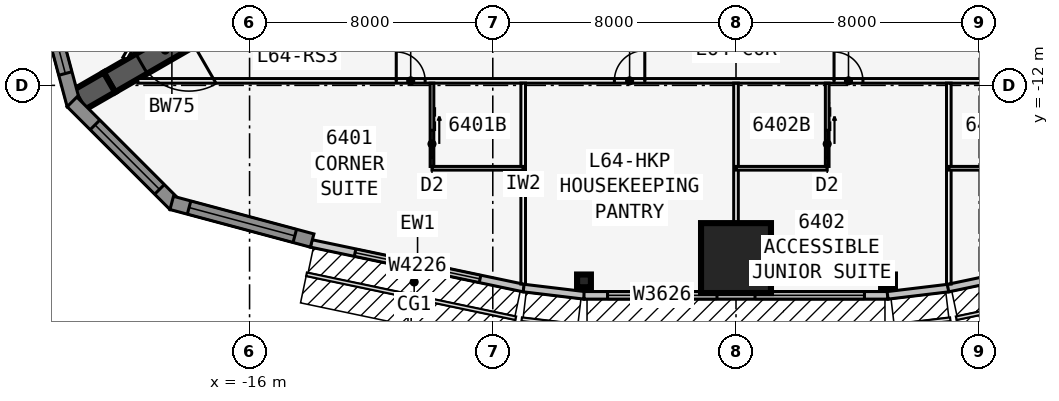
"""IFC4 building model, lengths in metres.
Left out: names, types, materials, properties, quantities, classifications, styles, units other than length and angle.
Written with IfcOpenShell. Run it as: python <this file> out.ifc"""

import sys

from ifc_helpers import new_model, si_unit, direction, frame, frame_2d, origin, origin_2d, place, context, subcontext, project, spatial, polyline, rectangle, i_section, outline, extrude, element, fill, save


model = new_model("IFC4")
c1 = context("Model", 3, precision=1e-05, world=origin(), true_north=direction((0.0, 1.0)))
c2 = subcontext(c1, "Body", "Model", "MODEL_VIEW")
j1 = project(units=[si_unit("LENGTHUNIT", "METRE"), si_unit("PLANEANGLEUNIT", "RADIAN")], contexts=[c1])
p1 = place(None, origin())
s1 = spatial("IfcSite", under=j1, at=p1, CompositionType="ELEMENT")
p2 = place(p1, origin())
s2 = spatial("IfcBuilding", under=s1, at=p2, CompositionType="ELEMENT")
p3 = place(p2, frame((0.0, 0.0, 242.9)))
s3 = spatial("IfcBuildingStorey", under=s2, at=p3, CompositionType="ELEMENT", Elevation=242.9)
p4 = place(p3, frame((-16.5, -9.526, 0.0), z_axis=(0.0, 0.0, 1.0), x_axis=(-0.866031398331, -0.499989616998, 0.0)))
e1 = element("IfcWall", 1, at=p4, inside=s3, PredefinedType="SHEAR", context=c2, shape_type="SweptSolid", body=[
    extrude(rectangle(XDim=4.746, YDim=0.75, at=frame_2d((2.373, 0.0))), origin(), (0.0, 0.0, 1.0), 3.6),
])
p5 = place(p4, frame((1.725, 0.0, 0.0)))
e2 = element("IfcOpeningElement", 2, at=p5, cuts=e1, PredefinedType="OPENING", context=c2, shape_type="SweptSolid", body=[
    extrude(rectangle(XDim=1.8, YDim=2.13, at=frame_2d((0.9, 1.065))), frame((0.0, 0.385, 0.0), z_axis=(0.0, -1.0, 0.0), x_axis=(1.0, 0.0, 0.0)), (0.0, 0.0, 1.0), 0.77),
])
p6 = place(p3, frame((-20.61, -11.899, 0.0), z_axis=(0.0, 0.0, 1.0), x_axis=(-0.866009537788, -0.500027479704, 0.0)))
e3 = element("IfcWall", 3, at=p6, inside=s3, PredefinedType="SHEAR", context=c2, shape_type="SweptSolid", body=[
    extrude(rectangle(XDim=1.155, YDim=0.75, at=frame_2d((0.577, 0.0))), origin(), (0.0, 0.0, 1.0), 3.6),
])
for number, where, z_axis, x_axis in (
    (4, (-5.0, -18.43, 0.0), (0.0, 0.0, 1.0), (0.0, -1.0, 0.0)),
    (5, (5.0, -18.43, 0.0), (0.0, 0.0, 1.0), (0.0, -1.0, 0.0)),
):
    element("IfcColumn", number, at=place(p3, frame(where, z_axis=z_axis, x_axis=x_axis)), inside=s3, PredefinedType="COLUMN", context=c2, shape_type="SweptSolid", body=[
        extrude(i_section(OverallWidth=0.419, OverallDepth=0.455, WebThickness=0.042, FlangeThickness=0.068, at=origin_2d()), origin(), (0.0, 0.0, 1.0), 3.6),
    ])
p7 = place(p3, frame((0.0, -17.68, 0.0), z_axis=(0.0, 0.0, 1.0), x_axis=(0.0, -1.0, 0.0)))
e6 = element("IfcColumn", 6, at=p7, inside=s3, PredefinedType="COLUMN", context=c2, shape_type="SweptSolid", body=[
    extrude(rectangle(XDim=2.3, YDim=2.3, at=origin_2d()), origin(), (0.0, 0.0, 1.0), 3.6),
])
p8 = place(p3, frame((-13.974, -17.198, 0.0), z_axis=(0.0, 0.0, 1.0), x_axis=(0.978654320409, -0.205513311355, 0.0)))
e7 = element("IfcWall", 7, at=p8, inside=s3, PredefinedType="STANDARD", context=c2, shape_type="SweptSolid", body=[
    extrude(rectangle(XDim=7.153, YDim=0.25, at=frame_2d((3.576, 0.0))), origin(), (0.0, 0.0, 1.0), 3.435),
])
p9 = place(p8, frame((1.476, 0.0, 0.45)))
e8 = element("IfcOpeningElement", 8, at=p9, cuts=e7, PredefinedType="OPENING", context=c2, shape_type="SweptSolid", body=[
    extrude(rectangle(XDim=4.2, YDim=2.6, at=frame_2d((2.1, 1.3))), frame((0.0, 0.135, 0.0), z_axis=(0.0, -1.0, 0.0), x_axis=(1.0, 0.0, 0.0)), (0.0, 0.0, 1.0), 0.27),
])
p10 = place(p3, frame((-6.985, -18.667, 0.0), z_axis=(0.0, 0.0, 1.0), x_axis=(0.992877411981, -0.119140441403, 0.0)))
e9 = element("IfcWall", 9, at=p10, inside=s3, PredefinedType="STANDARD", context=c2, shape_type="SweptSolid", body=[
    extrude(rectangle(XDim=2.014, YDim=0.25, at=frame_2d((1.007, 0.0))), origin(), (0.0, 0.0, 1.0), 3.435),
])
p11 = place(p3, frame((-5.0, -18.906, 0.0), z_axis=(0.0, 0.0, 1.0), x_axis=(1.0, 0.0, 0.0)))
e10 = element("IfcWall", 10, at=p11, inside=s3, PredefinedType="STANDARD", context=c2, shape_type="SweptSolid", body=[
    extrude(rectangle(XDim=10.0, YDim=0.25, at=frame_2d((5.0, 0.0))), origin(), (0.0, 0.0, 1.0), 3.435),
])
p12 = place(p11, frame((0.775, 0.0, 0.45)))
e11 = element("IfcOpeningElement", 11, at=p12, cuts=e10, PredefinedType="OPENING", context=c2, shape_type="SweptSolid", body=[
    extrude(rectangle(XDim=3.6, YDim=2.6, at=frame_2d((1.8, 1.3))), frame((0.0, 0.135, 0.0), z_axis=(0.0, -1.0, 0.0), x_axis=(1.0, 0.0, 0.0)), (0.0, 0.0, 1.0), 0.27),
])
p13 = place(p11, frame((5.625, 0.0, 0.45)))
e12 = element("IfcOpeningElement", 12, at=p13, cuts=e10, PredefinedType="OPENING", context=c2, shape_type="SweptSolid", body=[
    extrude(rectangle(XDim=3.6, YDim=2.6, at=frame_2d((1.8, 1.3))), frame((0.0, 0.135, 0.0), z_axis=(0.0, -1.0, 0.0), x_axis=(1.0, 0.0, 0.0)), (0.0, 0.0, 1.0), 0.27),
])
p14 = place(p3, frame((4.985, -18.906, 0.0), z_axis=(0.0, 0.0, 1.0), x_axis=(0.992877411981, 0.119140441403, 0.0)))
e13 = element("IfcWall", 13, at=p14, inside=s3, PredefinedType="STANDARD", context=c2, shape_type="SweptSolid", body=[
    extrude(rectangle(XDim=2.014, YDim=0.25, at=frame_2d((1.007, 0.0))), origin(), (0.0, 0.0, 1.0), 3.435),
])
p15 = place(p3, frame((6.974, -18.668, 0.0), z_axis=(0.0, 0.0, 1.0), x_axis=(0.978654320409, 0.205513311355, 0.0)))
e14 = element("IfcWall", 14, at=p15, inside=s3, PredefinedType="STANDARD", context=c2, shape_type="SweptSolid", body=[
    extrude(rectangle(XDim=7.153, YDim=0.25, at=frame_2d((3.576, 0.0))), origin(), (0.0, 0.0, 1.0), 3.435),
])
p16 = place(p15, frame((1.476, 0.0, 0.45)))
e15 = element("IfcOpeningElement", 15, at=p16, cuts=e14, PredefinedType="OPENING", context=c2, shape_type="SweptSolid", body=[
    extrude(rectangle(XDim=4.2, YDim=2.6, at=frame_2d((2.1, 1.3))), frame((0.0, 0.135, 0.0), z_axis=(0.0, -1.0, 0.0), x_axis=(1.0, 0.0, 0.0)), (0.0, 0.0, 1.0), 0.27),
])
p17 = place(p3, frame((-23.02, -8.025, 0.0), z_axis=(0.0, 0.0, 1.0), x_axis=(0.25880328844, -0.965930048136, 0.0)))
e16 = element("IfcWall", 16, at=p17, inside=s3, PredefinedType="SOLIDWALL", context=c2, shape_type="SweptSolid", body=[
    extrude(outline(polyline([(4.782, 0.225), (4.722, 0.225), (4.303, 0.113), (4.273, 0.225), (0.0, 0.225), (0.0, -0.225), (4.782, -0.225), (4.782, 0.225)])), origin(), (0.0, 0.0, 1.0), 3.435),
])
p18 = place(p17, frame((0.711, 0.0, 0.45)))
e17 = element("IfcOpeningElement", 17, at=p18, cuts=e16, PredefinedType="OPENING", context=c2, shape_type="SweptSolid", body=[
    extrude(rectangle(XDim=3.0, YDim=2.6, at=frame_2d((1.5, 1.3))), frame((0.0, 0.235, 0.0), z_axis=(0.0, -1.0, 0.0), x_axis=(1.0, 0.0, 0.0)), (0.0, 0.0, 1.0), 0.47),
])
p19 = place(p3, frame((-21.841, -12.542, 0.0), z_axis=(0.0, 0.0, 1.0), x_axis=(0.707081252484, -0.707132308968, 0.0)))
e18 = element("IfcWall", 18, at=p19, inside=s3, PredefinedType="SOLIDWALL", context=c2, shape_type="SweptSolid", body=[
    extrude(outline(polyline([(4.782, 0.225), (0.509, 0.225), (0.479, 0.113), (0.059, 0.225), (0.0, 0.225), (0.0, -0.225), (4.782, -0.225), (4.782, 0.225)])), origin(), (0.0, 0.0, 1.0), 3.435),
])
p20 = place(p19, frame((1.07, 0.0, 0.45)))
e19 = element("IfcOpeningElement", 19, at=p20, cuts=e18, PredefinedType="OPENING", context=c2, shape_type="SweptSolid", body=[
    extrude(rectangle(XDim=3.0, YDim=2.6, at=frame_2d((1.5, 1.3))), frame((0.0, 0.235, 0.0), z_axis=(0.0, -1.0, 0.0), x_axis=(1.0, 0.0, 0.0)), (0.0, 0.0, 1.0), 0.47),
])
p21 = place(p3, frame((-18.561, -15.865, 0.0), z_axis=(0.0, 0.0, 1.0), x_axis=(0.965913862671, -0.258863689806, 0.0)))
e20 = element("IfcWall", 20, at=p21, inside=s3, PredefinedType="SOLIDWALL", context=c2, shape_type="SweptSolid", body=[
    extrude(rectangle(XDim=4.782, YDim=0.45, at=frame_2d((2.391, 0.0))), origin(), (0.0, 0.0, 1.0), 3.435),
])
p22 = place(p21, frame((0.591, 0.0, 0.45)))
e21 = element("IfcOpeningElement", 21, at=p22, cuts=e20, PredefinedType="OPENING", context=c2, shape_type="SweptSolid", body=[
    extrude(rectangle(XDim=3.6, YDim=2.6, at=frame_2d((1.8, 1.3))), frame((0.0, 0.235, 0.0), z_axis=(0.0, -1.0, 0.0), x_axis=(1.0, 0.0, 0.0)), (0.0, 0.0, 1.0), 0.47),
])
p23 = place(p3, frame((-19.677, -11.851, 0.0), z_axis=(0.0, 0.0, 1.0), x_axis=(1.0, 0.0, 0.0)))
e22 = element("IfcWall", 22, at=p23, inside=s3, PredefinedType="PARTITIONING", context=c2, shape_type="SweptSolid", body=[
    extrude(rectangle(XDim=39.354, YDim=0.15, at=frame_2d((19.677, 0.0))), origin(), (0.0, 0.0, 1.0), 3.435),
])
p24 = place(p23, frame((8.502, 0.0, 0.0)))
e23 = element("IfcOpeningElement", 23, at=p24, cuts=e22, PredefinedType="OPENING", context=c2, shape_type="SweptSolid", body=[
    extrude(rectangle(XDim=0.95, YDim=2.13, at=frame_2d((0.475, 1.065))), frame((0.0, 0.085, 0.0), z_axis=(0.0, -1.0, 0.0), x_axis=(1.0, 0.0, 0.0)), (0.0, 0.0, 1.0), 0.17),
])
p25 = place(p23, frame((15.677, 0.0, 0.0)))
e24 = element("IfcOpeningElement", 24, at=p25, cuts=e22, PredefinedType="OPENING", context=c2, shape_type="SweptSolid", body=[
    extrude(rectangle(XDim=1.0, YDim=2.13, at=frame_2d((0.5, 1.065))), frame((0.0, 0.085, 0.0), z_axis=(0.0, -1.0, 0.0), x_axis=(1.0, 0.0, 0.0)), (0.0, 0.0, 1.0), 0.17),
])
p26 = place(p23, frame((22.902, 0.0, 0.0)))
e25 = element("IfcOpeningElement", 25, at=p26, cuts=e22, PredefinedType="OPENING", context=c2, shape_type="SweptSolid", body=[
    extrude(rectangle(XDim=0.95, YDim=2.13, at=frame_2d((0.475, 1.065))), frame((0.0, 0.085, 0.0), z_axis=(0.0, -1.0, 0.0), x_axis=(1.0, 0.0, 0.0)), (0.0, 0.0, 1.0), 0.17),
])
p27 = place(p23, frame((29.902, 0.0, 0.0)))
e26 = element("IfcOpeningElement", 26, at=p27, cuts=e22, PredefinedType="OPENING", context=c2, shape_type="SweptSolid", body=[
    extrude(rectangle(XDim=0.95, YDim=2.13, at=frame_2d((0.475, 1.065))), frame((0.0, 0.085, 0.0), z_axis=(0.0, -1.0, 0.0), x_axis=(1.0, 0.0, 0.0)), (0.0, 0.0, 1.0), 0.17),
])
p28 = place(p3, frame((-7.0, -11.926, 0.0), z_axis=(0.0, 0.0, 1.0), x_axis=(0.0, -1.0, 0.0)))
e27 = element("IfcWall", 27, at=p28, inside=s3, PredefinedType="PARTITIONING", context=c2, shape_type="SweptSolid", body=[
    extrude(rectangle(XDim=6.609, YDim=0.15, at=frame_2d((3.304, 0.0))), origin(), (0.0, 0.0, 1.0), 2.678),
])
p29 = place(p3, frame((0.0, -11.926, 0.0), z_axis=(0.0, 0.0, 1.0), x_axis=(0.0, -1.0, 0.0)))
e28 = element("IfcWall", 28, at=p29, inside=s3, PredefinedType="PARTITIONING", context=c2, shape_type="SweptSolid", body=[
    extrude(rectangle(XDim=6.854, YDim=0.15, at=frame_2d((3.427, 0.0))), origin(), (0.0, 0.0, 1.0), 2.678),
])
p30 = place(p3, frame((7.0, -11.926, 0.0), z_axis=(0.0, 0.0, 1.0), x_axis=(0.0, -1.0, 0.0)))
e29 = element("IfcWall", 29, at=p30, inside=s3, PredefinedType="PARTITIONING", context=c2, shape_type="SweptSolid", body=[
    extrude(rectangle(XDim=6.609, YDim=0.15, at=frame_2d((3.304, 0.0))), origin(), (0.0, 0.0, 1.0), 2.678),
])
p31 = place(p3, frame((-10.0, -14.726, 0.0), z_axis=(0.0, 0.0, 1.0), x_axis=(1.0, 0.0, 0.0)))
e30 = element("IfcWall", 30, at=p31, inside=s3, PredefinedType="PLUMBINGWALL", context=c2, shape_type="SweptSolid", body=[
    extrude(rectangle(XDim=3.0, YDim=0.12, at=frame_2d((1.5, 0.0))), origin(), (0.0, 0.0, 1.0), 3.435),
])
p32 = place(p3, frame((-10.0, -11.926, 0.0), z_axis=(0.0, 0.0, 1.0), x_axis=(0.0, -1.0, 0.0)))
e31 = element("IfcWall", 31, at=p32, inside=s3, PredefinedType="PLUMBINGWALL", context=c2, shape_type="SweptSolid", body=[
    extrude(rectangle(XDim=2.74, YDim=0.12, at=frame_2d((1.37, 0.0))), origin(), (0.0, 0.0, 1.0), 3.435),
])
p33 = place(p32, frame((1.55, 0.0, 0.0)))
e32 = element("IfcOpeningElement", 32, at=p33, cuts=e31, PredefinedType="OPENING", context=c2, shape_type="SweptSolid", body=[
    extrude(rectangle(XDim=0.9, YDim=2.13, at=frame_2d((0.45, 1.065))), frame((0.0, 0.07, 0.0), z_axis=(0.0, -1.0, 0.0), x_axis=(1.0, 0.0, 0.0)), (0.0, 0.0, 1.0), 0.14),
])
p34 = place(p3, frame((0.0, -14.726, 0.0), z_axis=(0.0, 0.0, 1.0), x_axis=(1.0, 0.0, 0.0)))
e33 = element("IfcWall", 33, at=p34, inside=s3, PredefinedType="PLUMBINGWALL", context=c2, shape_type="SweptSolid", body=[
    extrude(rectangle(XDim=3.0, YDim=0.12, at=frame_2d((1.5, 0.0))), origin(), (0.0, 0.0, 1.0), 3.435),
])
p35 = place(p3, frame((3.0, -11.926, 0.0), z_axis=(0.0, 0.0, 1.0), x_axis=(0.0, -1.0, 0.0)))
e34 = element("IfcWall", 34, at=p35, inside=s3, PredefinedType="PLUMBINGWALL", context=c2, shape_type="SweptSolid", body=[
    extrude(rectangle(XDim=2.74, YDim=0.12, at=frame_2d((1.37, 0.0))), origin(), (0.0, 0.0, 1.0), 3.435),
])
p36 = place(p35, frame((1.55, 0.0, 0.0)))
e35 = element("IfcOpeningElement", 35, at=p36, cuts=e34, PredefinedType="OPENING", context=c2, shape_type="SweptSolid", body=[
    extrude(rectangle(XDim=0.9, YDim=2.13, at=frame_2d((0.45, 1.065))), frame((0.0, 0.07, 0.0), z_axis=(0.0, -1.0, 0.0), x_axis=(1.0, 0.0, 0.0)), (0.0, 0.0, 1.0), 0.14),
])
p37 = place(p3, frame((7.0, -14.726, 0.0), z_axis=(0.0, 0.0, 1.0), x_axis=(1.0, 0.0, 0.0)))
e36 = element("IfcWall", 36, at=p37, inside=s3, PredefinedType="PLUMBINGWALL", context=c2, shape_type="SweptSolid", body=[
    extrude(rectangle(XDim=3.0, YDim=0.12, at=frame_2d((1.5, 0.0))), origin(), (0.0, 0.0, 1.0), 3.435),
])
p38 = place(p3, frame((-0.425, 22.966, 0.0), z_axis=(0.0, 0.0, 1.0), x_axis=(-0.500000265775, -0.866025250339, 0.0)))
e37 = element("IfcWall", 37, at=p38, inside=s3, PredefinedType="PARTITIONING", context=c2, shape_type="SweptSolid", body=[
    extrude(rectangle(XDim=39.354, YDim=0.15, at=frame_2d((19.677, 0.0))), origin(), (0.0, 0.0, 1.0), 3.435),
])
p39 = place(p38, frame((8.502, 0.0, 0.0)))
e38 = element("IfcOpeningElement", 38, at=p39, cuts=e37, PredefinedType="OPENING", context=c2, shape_type="SweptSolid", body=[
    extrude(rectangle(XDim=0.95, YDim=2.13, at=frame_2d((0.475, 1.065))), frame((0.0, 0.085, 0.0), z_axis=(0.0, -1.0, 0.0), x_axis=(1.0, 0.0, 0.0)), (0.0, 0.0, 1.0), 0.17),
])
p40 = place(p38, frame((15.902, 0.0, 0.0)))
e39 = element("IfcOpeningElement", 39, at=p40, cuts=e37, PredefinedType="OPENING", context=c2, shape_type="SweptSolid", body=[
    extrude(rectangle(XDim=0.95, YDim=2.13, at=frame_2d((0.475, 1.065))), frame((0.0, 0.085, 0.0), z_axis=(0.0, -1.0, 0.0), x_axis=(1.0, 0.0, 0.0)), (0.0, 0.0, 1.0), 0.17),
])
p41 = place(p38, frame((22.902, 0.0, 0.0)))
e40 = element("IfcOpeningElement", 40, at=p41, cuts=e37, PredefinedType="OPENING", context=c2, shape_type="SweptSolid", body=[
    extrude(rectangle(XDim=0.95, YDim=2.13, at=frame_2d((0.475, 1.065))), frame((0.0, 0.085, 0.0), z_axis=(0.0, -1.0, 0.0), x_axis=(1.0, 0.0, 0.0)), (0.0, 0.0, 1.0), 0.17),
])
p42 = place(p38, frame((29.902, 0.0, 0.0)))
e41 = element("IfcOpeningElement", 41, at=p42, cuts=e37, PredefinedType="OPENING", context=c2, shape_type="SweptSolid", body=[
    extrude(rectangle(XDim=0.95, YDim=2.13, at=frame_2d((0.475, 1.065))), frame((0.0, 0.085, 0.0), z_axis=(0.0, -1.0, 0.0), x_axis=(1.0, 0.0, 0.0)), (0.0, 0.0, 1.0), 0.17),
])
p43 = place(p9, origin())
e42 = element("IfcWindow", 42, at=p43, inside=s3, PartitioningType="SINGLE_PANEL", PredefinedType="WINDOW", context=c2, shape_type="SweptSolid", body=[
    extrude(rectangle(XDim=4.2, YDim=2.6, at=frame_2d((2.1, 1.3))), frame((0.0, 0.03, 0.0), z_axis=(0.0, -1.0, 0.0), x_axis=(1.0, 0.0, 0.0)), (0.0, 0.0, 1.0), 0.06),
])
fill(e8, e42)
p44 = place(p12, origin())
e43 = element("IfcWindow", 43, at=p44, inside=s3, PartitioningType="SINGLE_PANEL", PredefinedType="WINDOW", context=c2, shape_type="SweptSolid", body=[
    extrude(rectangle(XDim=3.6, YDim=2.6, at=frame_2d((1.8, 1.3))), frame((0.0, 0.03, 0.0), z_axis=(0.0, -1.0, 0.0), x_axis=(1.0, 0.0, 0.0)), (0.0, 0.0, 1.0), 0.06),
])
fill(e11, e43)
p45 = place(p13, origin())
e44 = element("IfcWindow", 44, at=p45, inside=s3, PartitioningType="SINGLE_PANEL", PredefinedType="WINDOW", context=c2, shape_type="SweptSolid", body=[
    extrude(rectangle(XDim=3.6, YDim=2.6, at=frame_2d((1.8, 1.3))), frame((0.0, 0.03, 0.0), z_axis=(0.0, -1.0, 0.0), x_axis=(1.0, 0.0, 0.0)), (0.0, 0.0, 1.0), 0.06),
])
fill(e12, e44)
p46 = place(p18, origin())
e45 = element("IfcWindow", 45, at=p46, inside=s3, PartitioningType="SINGLE_PANEL", PredefinedType="WINDOW", context=c2, shape_type="SweptSolid", body=[
    extrude(rectangle(XDim=3.0, YDim=2.6, at=frame_2d((1.5, 1.3))), frame((0.0, 0.03, 0.0), z_axis=(0.0, -1.0, 0.0), x_axis=(1.0, 0.0, 0.0)), (0.0, 0.0, 1.0), 0.06),
])
fill(e17, e45)
p47 = place(p20, origin())
e46 = element("IfcWindow", 46, at=p47, inside=s3, PartitioningType="SINGLE_PANEL", PredefinedType="WINDOW", context=c2, shape_type="SweptSolid", body=[
    extrude(rectangle(XDim=3.0, YDim=2.6, at=frame_2d((1.5, 1.3))), frame((0.0, 0.03, 0.0), z_axis=(0.0, -1.0, 0.0), x_axis=(1.0, 0.0, 0.0)), (0.0, 0.0, 1.0), 0.06),
])
fill(e19, e46)
p48 = place(p22, origin())
e47 = element("IfcWindow", 47, at=p48, inside=s3, PartitioningType="SINGLE_PANEL", PredefinedType="WINDOW", context=c2, shape_type="SweptSolid", body=[
    extrude(rectangle(XDim=3.6, YDim=2.6, at=frame_2d((1.8, 1.3))), frame((0.0, 0.03, 0.0), z_axis=(0.0, -1.0, 0.0), x_axis=(1.0, 0.0, 0.0)), (0.0, 0.0, 1.0), 0.06),
])
fill(e21, e47)
p49 = place(p33, origin())
e48 = element("IfcDoor", 48, at=p49, inside=s3, OperationType="SLIDING_TO_LEFT", PredefinedType="DOOR", context=c2, shape_type="SweptSolid", body=[
    extrude(rectangle(XDim=0.9, YDim=2.13, at=frame_2d((0.45, 1.065))), frame((0.0, 0.025, 0.0), z_axis=(0.0, -1.0, 0.0), x_axis=(1.0, 0.0, 0.0)), (0.0, 0.0, 1.0), 0.05),
])
fill(e32, e48)
p50 = place(p24, origin())
e49 = element("IfcDoor", 49, at=p50, inside=s3, OperationType="SINGLE_SWING_LEFT", PredefinedType="DOOR", context=c2, shape_type="SweptSolid", body=[
    extrude(rectangle(XDim=0.95, YDim=2.13, at=frame_2d((0.475, 1.065))), frame((0.0, 0.025, 0.0), z_axis=(0.0, -1.0, 0.0), x_axis=(1.0, 0.0, 0.0)), (0.0, 0.0, 1.0), 0.05),
])
fill(e23, e49)
p51 = place(p25, origin())
e50 = element("IfcDoor", 50, at=p51, inside=s3, OperationType="SINGLE_SWING_RIGHT", PredefinedType="DOOR", context=c2, shape_type="SweptSolid", body=[
    extrude(rectangle(XDim=1.0, YDim=2.13, at=frame_2d((0.5, 1.065))), frame((0.0, 0.025, 0.0), z_axis=(0.0, -1.0, 0.0), x_axis=(1.0, 0.0, 0.0)), (0.0, 0.0, 1.0), 0.05),
])
fill(e24, e50)
p52 = place(p36, origin())
e51 = element("IfcDoor", 51, at=p52, inside=s3, OperationType="SLIDING_TO_LEFT", PredefinedType="DOOR", context=c2, shape_type="SweptSolid", body=[
    extrude(rectangle(XDim=0.9, YDim=2.13, at=frame_2d((0.45, 1.065))), frame((0.0, 0.025, 0.0), z_axis=(0.0, -1.0, 0.0), x_axis=(1.0, 0.0, 0.0)), (0.0, 0.0, 1.0), 0.05),
])
fill(e35, e51)
p53 = place(p26, origin())
e52 = element("IfcDoor", 52, at=p53, inside=s3, OperationType="SINGLE_SWING_LEFT", PredefinedType="DOOR", context=c2, shape_type="SweptSolid", body=[
    extrude(rectangle(XDim=0.95, YDim=2.13, at=frame_2d((0.475, 1.065))), frame((0.0, 0.025, 0.0), z_axis=(0.0, -1.0, 0.0), x_axis=(1.0, 0.0, 0.0)), (0.0, 0.0, 1.0), 0.05),
])
fill(e25, e52)
p54 = place(p5, origin())
e53 = element("IfcDoor", 53, at=p54, inside=s3, OperationType="DOUBLE_DOOR_DOUBLE_SWING", PredefinedType="DOOR", context=c2, shape_type="SweptSolid", body=[
    extrude(rectangle(XDim=1.8, YDim=2.13, at=frame_2d((0.9, 1.065))), frame((0.0, 0.025, 0.0), z_axis=(0.0, -1.0, 0.0), x_axis=(1.0, 0.0, 0.0)), (0.0, 0.0, 1.0), 0.05),
])
fill(e2, e53)
save(model, sys.argv[1])
